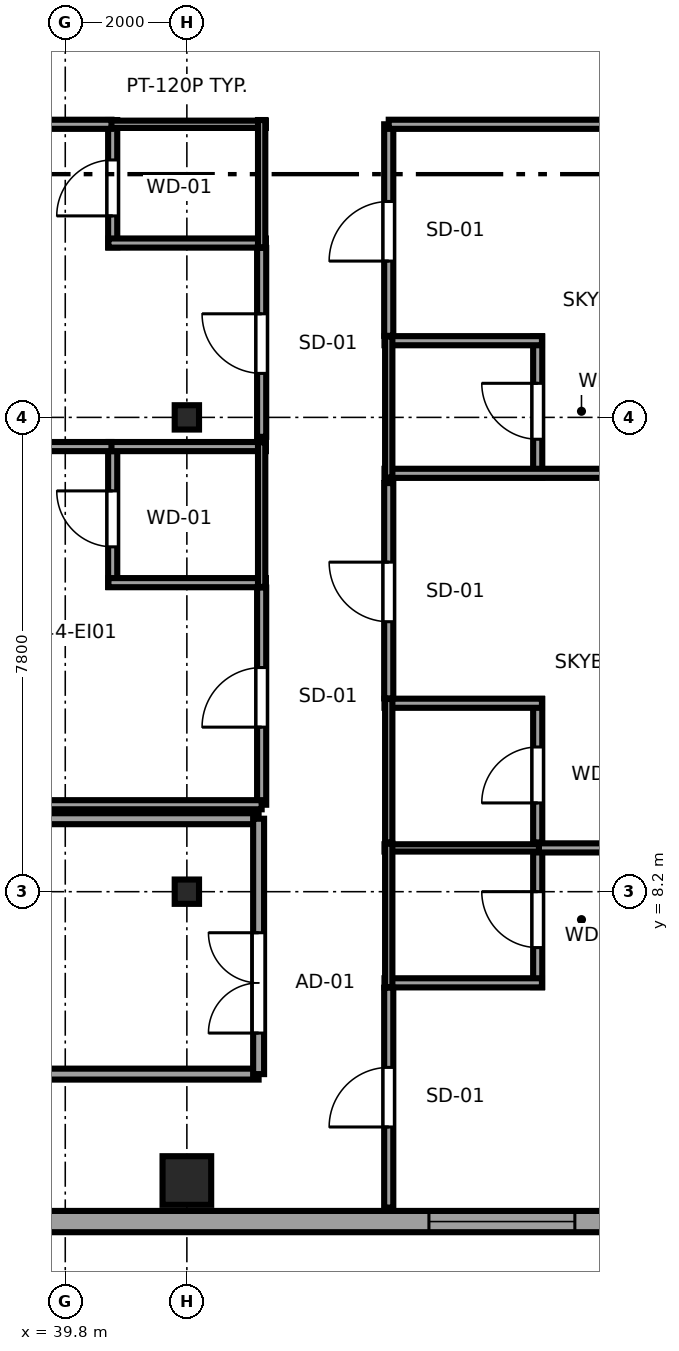
"""IFC4 building model, lengths in metres.
Left out: names, types, materials, properties, quantities, classifications, styles, units other than length and angle.
Written with IfcOpenShell. Run it as: python <this file> out.ifc"""

import sys

from ifc_helpers import new_model, si_unit, direction, frame, frame_2d, origin, origin_2d, place, context, subcontext, project, spatial, rectangle, i_section, extrude, source, transform, mapped, element, fill, save


model = new_model("IFC4")
c1 = context("Model", 3, precision=1e-05, world=origin(), true_north=direction((0.0, 1.0)))
c2 = subcontext(c1, "Body", "Model", "MODEL_VIEW")
j1 = project(units=[si_unit("LENGTHUNIT", "METRE"), si_unit("PLANEANGLEUNIT", "RADIAN")], contexts=[c1])
p1 = place(None, origin())
s1 = spatial("IfcSite", under=j1, at=p1, CompositionType="ELEMENT")
p2 = place(p1, origin())
s2 = spatial("IfcBuilding", under=s1, at=p2, CompositionType="ELEMENT")
p3 = place(p2, frame((0.0, 0.0, 168.35)))
s3 = spatial("IfcBuildingStorey", under=s2, at=p3, CompositionType="ELEMENT", Elevation=168.35)
m1 = source(origin(), c2, "Body", "SweptSolid", [
    extrude(rectangle(XDim=0.8, YDim=0.8, at=origin_2d()), origin(), (0.0, 0.0, 1.0), 3.55),
])
p4 = place(p3, frame((41.8, 3.45, 0.0), z_axis=(0.0, 0.0, 1.0), x_axis=(1.0, 0.0, 0.0)))
e1 = element("IfcColumn", 1, at=p4, inside=s3, PredefinedType="COLUMN", context=c2, shape_type="MappedRepresentation", body=[
    mapped(m1, transform((0.0, 0.0, 0.0), x_axis=(1.0, 0.0, 0.0), y_axis=(0.0, 1.0, 0.0), z_axis=(0.0, 0.0, 1.0), scale=1.0)),
])
m2 = source(origin(), c2, "Body", "SweptSolid", [
    extrude(i_section(OverallWidth=0.4, OverallDepth=0.4, WebThickness=0.02, FlangeThickness=0.035, at=origin_2d()), origin(), (0.0, 0.0, 1.0), 3.55),
])
for number, where, z_axis, x_axis in (
    (2, (41.8, 8.2, 0.0), (0.0, 0.0, 1.0), (1.0, 0.0, 0.0)),
    (3, (41.8, 16.0, 0.0), (0.0, 0.0, 1.0), (1.0, 0.0, 0.0)),
):
    element("IfcColumn", number, at=place(p3, frame(where, z_axis=z_axis, x_axis=x_axis)), inside=s3, PredefinedType="COLUMN", context=c2, shape_type="MappedRepresentation", body=[
        mapped(m2, transform((0.0, 0.0, 0.0), x_axis=(1.0, 0.0, 0.0), y_axis=(0.0, 1.0, 0.0), z_axis=(0.0, 0.0, 1.0), scale=1.0)),
    ])
p5 = place(p3, frame((34.375, 2.775, 0.0), z_axis=(0.0, 0.0, 1.0), x_axis=(1.0, 0.0, 0.0)))
e4 = element("IfcWall", 4, at=p5, inside=s3, PredefinedType="SOLIDWALL", context=c2, shape_type="SweptSolid", body=[
    extrude(rectangle(XDim=15.608, YDim=0.35, at=frame_2d((7.804, 0.0))), origin(), (0.0, 0.0, 1.0), 3.37),
])
p6 = place(p5, frame((1.801, 0.0, 0.68)))
e5 = element("IfcOpeningElement", 5, at=p6, cuts=e4, PredefinedType="OPENING", context=c2, shape_type="SweptSolid", body=[
    extrude(rectangle(XDim=2.4, YDim=1.9, at=frame_2d((1.2, 0.95))), frame((0.0, 0.185, 0.0), z_axis=(0.0, -1.0, 0.0), x_axis=(1.0, 0.0, 0.0)), (0.0, 0.0, 1.0), 0.37),
])
p7 = place(p5, frame((11.406, 0.0, 0.68)))
e6 = element("IfcOpeningElement", 6, at=p7, cuts=e4, PredefinedType="OPENING", context=c2, shape_type="SweptSolid", body=[
    extrude(rectangle(XDim=2.4, YDim=1.9, at=frame_2d((1.2, 0.95))), frame((0.0, 0.185, 0.0), z_axis=(0.0, -1.0, 0.0), x_axis=(1.0, 0.0, 0.0)), (0.0, 0.0, 1.0), 0.37),
])
p8 = place(p3, frame((40.58, 13.212, 0.0), z_axis=(0.0, 0.0, 1.0), x_axis=(0.0, 1.0, 0.0)))
e7 = element("IfcWall", 7, at=p8, inside=s3, PredefinedType="PARTITIONING", context=c2, shape_type="SweptSolid", body=[
    extrude(rectangle(XDim=2.378, YDim=0.15, at=frame_2d((1.189, 0.0))), origin(), (0.0, 0.0, 1.0), 3.37),
])
p9 = place(p8, frame((0.659, 0.0, 0.0)))
e8 = element("IfcOpeningElement", 8, at=p9, cuts=e7, PredefinedType="OPENING", context=c2, shape_type="SweptSolid", body=[
    extrude(rectangle(XDim=0.92, YDim=2.01, at=frame_2d((0.46, 1.005))), frame((0.0, 0.085, 0.0), z_axis=(0.0, -1.0, 0.0), x_axis=(1.0, 0.0, 0.0)), (0.0, 0.0, 1.0), 0.17),
])
for number, where, z_axis, x_axis in (
    (9, (40.51, 13.282, 0.0), (0.0, 0.0, 1.0), (1.0, 0.0, 0.0)),
    (10, (40.51, 15.52, 0.0), (0.0, 0.0, 1.0), (1.0, 0.0, 0.0)),
):
    element("IfcWall", number, at=place(p3, frame(where, z_axis=z_axis, x_axis=x_axis)), inside=s3, PredefinedType="PARTITIONING", context=c2, shape_type="SweptSolid", body=[
        extrude(rectangle(XDim=2.59, YDim=0.15, at=frame_2d((1.295, 0.0))), origin(), (0.0, 0.0, 1.0), 3.37),
    ])
p10 = place(p3, frame((43.03, 13.212, 0.0), z_axis=(0.0, 0.0, 1.0), x_axis=(0.0, 1.0, 0.0)))
e11 = element("IfcWall", 11, at=p10, inside=s3, PredefinedType="PLUMBINGWALL", context=c2, shape_type="SweptSolid", body=[
    extrude(rectangle(XDim=2.378, YDim=0.12, at=frame_2d((1.189, 0.0))), origin(), (0.0, 0.0, 1.0), 3.37),
])
p11 = place(p3, frame((40.58, 18.797, 0.0), z_axis=(0.0, 0.0, 1.0), x_axis=(0.0, 1.0, 0.0)))
e12 = element("IfcWall", 12, at=p11, inside=s3, PredefinedType="PARTITIONING", context=c2, shape_type="SweptSolid", body=[
    extrude(rectangle(XDim=2.093, YDim=0.15, at=frame_2d((1.046, 0.0))), origin(), (0.0, 0.0, 1.0), 3.37),
])
p12 = place(p11, frame((0.517, 0.0, 0.0)))
e13 = element("IfcOpeningElement", 13, at=p12, cuts=e12, PredefinedType="OPENING", context=c2, shape_type="SweptSolid", body=[
    extrude(rectangle(XDim=0.92, YDim=2.01, at=frame_2d((0.46, 1.005))), frame((0.0, 0.085, 0.0), z_axis=(0.0, -1.0, 0.0), x_axis=(1.0, 0.0, 0.0)), (0.0, 0.0, 1.0), 0.17),
])
p13 = place(p3, frame((40.51, 18.867, 0.0), z_axis=(0.0, 0.0, 1.0), x_axis=(1.0, 0.0, 0.0)))
e14 = element("IfcWall", 14, at=p13, inside=s3, PredefinedType="PARTITIONING", context=c2, shape_type="SweptSolid", body=[
    extrude(rectangle(XDim=2.59, YDim=0.15, at=frame_2d((1.295, 0.0))), origin(), (0.0, 0.0, 1.0), 3.37),
])
p14 = place(p3, frame((40.51, 20.82, 0.0), z_axis=(0.0, 0.0, 1.0), x_axis=(1.0, 0.0, 0.0)))
e15 = element("IfcWall", 15, at=p14, inside=s3, PredefinedType="PLUMBINGWALL", context=c2, shape_type="SweptSolid", body=[
    extrude(rectangle(XDim=2.59, YDim=0.12, at=frame_2d((1.295, 0.0))), origin(), (0.0, 0.0, 1.0), 3.37),
])
p15 = place(p3, frame((43.03, 18.797, 0.0), z_axis=(0.0, 0.0, 1.0), x_axis=(0.0, 1.0, 0.0)))
e16 = element("IfcWall", 16, at=p15, inside=s3, PredefinedType="PLUMBINGWALL", context=c2, shape_type="SweptSolid", body=[
    extrude(rectangle(XDim=2.093, YDim=0.12, at=frame_2d((1.046, 0.0))), origin(), (0.0, 0.0, 1.0), 3.37),
])
p16 = place(p3, frame((47.57, 6.631, 0.0), z_axis=(0.0, 0.0, 1.0), x_axis=(0.0, 1.0, 0.0)))
e17 = element("IfcWall", 17, at=p16, inside=s3, PredefinedType="PARTITIONING", context=c2, shape_type="SweptSolid", body=[
    extrude(rectangle(XDim=2.359, YDim=0.15, at=frame_2d((1.179, 0.0))), origin(), (0.0, 0.0, 1.0), 3.37),
])
p17 = place(p16, frame((0.649, 0.0, 0.0)))
e18 = element("IfcOpeningElement", 18, at=p17, cuts=e17, PredefinedType="OPENING", context=c2, shape_type="SweptSolid", body=[
    extrude(rectangle(XDim=0.92, YDim=2.01, at=frame_2d((0.46, 1.005))), frame((0.0, 0.085, 0.0), z_axis=(0.0, -1.0, 0.0), x_axis=(1.0, 0.0, 0.0)), (0.0, 0.0, 1.0), 0.17),
])
p18 = place(p3, frame((45.05, 6.701, 0.0), z_axis=(0.0, 0.0, 1.0), x_axis=(1.0, 0.0, 0.0)))
e19 = element("IfcWall", 19, at=p18, inside=s3, PredefinedType="PARTITIONING", context=c2, shape_type="SweptSolid", body=[
    extrude(rectangle(XDim=2.59, YDim=0.15, at=frame_2d((1.295, 0.0))), origin(), (0.0, 0.0, 1.0), 3.37),
])
p19 = place(p3, frame((45.05, 8.92, 0.0), z_axis=(0.0, 0.0, 1.0), x_axis=(1.0, 0.0, 0.0)))
e20 = element("IfcWall", 20, at=p19, inside=s3, PredefinedType="PLUMBINGWALL", context=c2, shape_type="SweptSolid", body=[
    extrude(rectangle(XDim=2.59, YDim=0.12, at=frame_2d((1.295, 0.0))), origin(), (0.0, 0.0, 1.0), 3.37),
])
p20 = place(p3, frame((45.12, 6.631, 0.0), z_axis=(0.0, 0.0, 1.0), x_axis=(0.0, 1.0, 0.0)))
e21 = element("IfcWall", 21, at=p20, inside=s3, PredefinedType="PLUMBINGWALL", context=c2, shape_type="SweptSolid", body=[
    extrude(rectangle(XDim=2.359, YDim=0.12, at=frame_2d((1.179, 0.0))), origin(), (0.0, 0.0, 1.0), 3.37),
])
p21 = place(p3, frame((47.57, 9.01, 0.0), z_axis=(0.0, 0.0, 1.0), x_axis=(0.0, 1.0, 0.0)))
e22 = element("IfcWall", 22, at=p21, inside=s3, PredefinedType="PARTITIONING", context=c2, shape_type="SweptSolid", body=[
    extrude(rectangle(XDim=2.359, YDim=0.15, at=frame_2d((1.179, 0.0))), origin(), (0.0, 0.0, 1.0), 3.37),
])
p22 = place(p21, frame((0.649, 0.0, 0.0)))
e23 = element("IfcOpeningElement", 23, at=p22, cuts=e22, PredefinedType="OPENING", context=c2, shape_type="SweptSolid", body=[
    extrude(rectangle(XDim=0.92, YDim=2.01, at=frame_2d((0.46, 1.005))), frame((0.0, 0.085, 0.0), z_axis=(0.0, -1.0, 0.0), x_axis=(1.0, 0.0, 0.0)), (0.0, 0.0, 1.0), 0.17),
])
p23 = place(p3, frame((45.05, 11.299, 0.0), z_axis=(0.0, 0.0, 1.0), x_axis=(1.0, 0.0, 0.0)))
e24 = element("IfcWall", 24, at=p23, inside=s3, PredefinedType="PARTITIONING", context=c2, shape_type="SweptSolid", body=[
    extrude(rectangle(XDim=2.59, YDim=0.15, at=frame_2d((1.295, 0.0))), origin(), (0.0, 0.0, 1.0), 3.37),
])
p24 = place(p3, frame((45.12, 9.01, 0.0), z_axis=(0.0, 0.0, 1.0), x_axis=(0.0, 1.0, 0.0)))
e25 = element("IfcWall", 25, at=p24, inside=s3, PredefinedType="PLUMBINGWALL", context=c2, shape_type="SweptSolid", body=[
    extrude(rectangle(XDim=2.359, YDim=0.12, at=frame_2d((1.179, 0.0))), origin(), (0.0, 0.0, 1.0), 3.37),
])
p25 = place(p3, frame((47.57, 15.01, 0.0), z_axis=(0.0, 0.0, 1.0), x_axis=(0.0, 1.0, 0.0)))
e26 = element("IfcWall", 26, at=p25, inside=s3, PredefinedType="PARTITIONING", context=c2, shape_type="SweptSolid", body=[
    extrude(rectangle(XDim=2.321, YDim=0.15, at=frame_2d((1.161, 0.0))), origin(), (0.0, 0.0, 1.0), 3.37),
])
p26 = place(p25, frame((0.631, 0.0, 0.0)))
e27 = element("IfcOpeningElement", 27, at=p26, cuts=e26, PredefinedType="OPENING", context=c2, shape_type="SweptSolid", body=[
    extrude(rectangle(XDim=0.92, YDim=2.01, at=frame_2d((0.46, 1.005))), frame((0.0, 0.085, 0.0), z_axis=(0.0, -1.0, 0.0), x_axis=(1.0, 0.0, 0.0)), (0.0, 0.0, 1.0), 0.17),
])
p27 = place(p3, frame((45.05, 15.08, 0.0), z_axis=(0.0, 0.0, 1.0), x_axis=(1.0, 0.0, 0.0)))
e28 = element("IfcWall", 28, at=p27, inside=s3, PredefinedType="PARTITIONING", context=c2, shape_type="SweptSolid", body=[
    extrude(rectangle(XDim=9.05, YDim=0.15, at=frame_2d((4.525, 0.0))), origin(), (0.0, 0.0, 1.0), 3.37),
])
p28 = place(p3, frame((45.05, 17.261, 0.0), z_axis=(0.0, 0.0, 1.0), x_axis=(1.0, 0.0, 0.0)))
e29 = element("IfcWall", 29, at=p28, inside=s3, PredefinedType="PARTITIONING", context=c2, shape_type="SweptSolid", body=[
    extrude(rectangle(XDim=2.59, YDim=0.15, at=frame_2d((1.295, 0.0))), origin(), (0.0, 0.0, 1.0), 3.37),
])
p29 = place(p3, frame((45.12, 15.01, 0.0), z_axis=(0.0, 0.0, 1.0), x_axis=(0.0, 1.0, 0.0)))
e30 = element("IfcWall", 30, at=p29, inside=s3, PredefinedType="PLUMBINGWALL", context=c2, shape_type="SweptSolid", body=[
    extrude(rectangle(XDim=2.321, YDim=0.12, at=frame_2d((1.161, 0.0))), origin(), (0.0, 0.0, 1.0), 3.37),
])
p30 = place(p3, frame((43.03, 9.63, 0.0), z_axis=(0.0, 0.0, 1.0), x_axis=(0.0, 1.0, 0.0)))
e31 = element("IfcWall", 31, at=p30, inside=s3, PredefinedType="PARTITIONING", context=c2, shape_type="SweptSolid", body=[
    extrude(rectangle(XDim=3.572, YDim=0.15, at=frame_2d((1.786, 0.0))), origin(), (0.0, 0.0, 1.0), 3.37),
])
p31 = place(p30, frame((1.276, 0.0, 0.0)))
e32 = element("IfcOpeningElement", 32, at=p31, cuts=e31, PredefinedType="OPENING", context=c2, shape_type="SweptSolid", body=[
    extrude(rectangle(XDim=0.98, YDim=2.12, at=frame_2d((0.49, 1.06))), frame((0.0, 0.085, 0.0), z_axis=(0.0, -1.0, 0.0), x_axis=(1.0, 0.0, 0.0)), (0.0, 0.0, 1.0), 0.17),
])
p32 = place(p3, frame((34.65, 9.63, 0.0), z_axis=(0.0, 0.0, 1.0), x_axis=(1.0, 0.0, 0.0)))
e33 = element("IfcWall", 33, at=p32, inside=s3, PredefinedType="PARTITIONING", context=c2, shape_type="SweptSolid", body=[
    extrude(rectangle(XDim=8.38, YDim=0.15, at=frame_2d((4.19, 0.0))), origin(), (0.0, 0.0, 1.0), 2.748),
])
p33 = place(p3, frame((34.65, 15.52, 0.0), z_axis=(0.0, 0.0, 1.0), x_axis=(1.0, 0.0, 0.0)))
e34 = element("IfcWall", 34, at=p33, inside=s3, PredefinedType="PARTITIONING", context=c2, shape_type="SweptSolid", body=[
    extrude(rectangle(XDim=5.91, YDim=0.15, at=frame_2d((2.955, 0.0))), origin(), (0.0, 0.0, 1.0), 3.37),
])
p34 = place(p3, frame((43.03, 15.68, 0.0), z_axis=(0.0, 0.0, 1.0), x_axis=(0.0, 1.0, 0.0)))
e35 = element("IfcWall", 35, at=p34, inside=s3, PredefinedType="PARTITIONING", context=c2, shape_type="SweptSolid", body=[
    extrude(rectangle(XDim=3.107, YDim=0.15, at=frame_2d((1.554, 0.0))), origin(), (0.0, 0.0, 1.0), 3.37),
])
p35 = place(p34, frame((1.043, 0.0, 0.0)))
e36 = element("IfcOpeningElement", 36, at=p35, cuts=e35, PredefinedType="OPENING", context=c2, shape_type="SweptSolid", body=[
    extrude(rectangle(XDim=0.98, YDim=2.12, at=frame_2d((0.49, 1.06))), frame((0.0, 0.085, 0.0), z_axis=(0.0, -1.0, 0.0), x_axis=(1.0, 0.0, 0.0)), (0.0, 0.0, 1.0), 0.17),
])
p36 = place(p3, frame((34.65, 20.82, 0.0), z_axis=(0.0, 0.0, 1.0), x_axis=(1.0, 0.0, 0.0)))
e37 = element("IfcWall", 37, at=p36, inside=s3, PredefinedType="PARTITIONING", context=c2, shape_type="SweptSolid", body=[
    extrude(rectangle(XDim=5.91, YDim=0.15, at=frame_2d((2.955, 0.0))), origin(), (0.0, 0.0, 1.0), 3.37),
])
p37 = place(p3, frame((45.12, 3.005, 0.0), z_axis=(0.0, 0.0, 1.0), x_axis=(0.0, 1.0, 0.0)))
e38 = element("IfcWall", 38, at=p37, inside=s3, PredefinedType="PARTITIONING", context=c2, shape_type="SweptSolid", body=[
    extrude(rectangle(XDim=3.616, YDim=0.15, at=frame_2d((1.808, 0.0))), origin(), (0.0, 0.0, 1.0), 3.37),
])
p38 = place(p37, frame((1.325, 0.0, 0.0)))
e39 = element("IfcOpeningElement", 39, at=p38, cuts=e38, PredefinedType="OPENING", context=c2, shape_type="SweptSolid", body=[
    extrude(rectangle(XDim=0.98, YDim=2.12, at=frame_2d((0.49, 1.06))), frame((0.0, 0.085, 0.0), z_axis=(0.0, -1.0, 0.0), x_axis=(1.0, 0.0, 0.0)), (0.0, 0.0, 1.0), 0.17),
])
p39 = place(p3, frame((47.59, 8.92, 0.0), z_axis=(0.0, 0.0, 1.0), x_axis=(1.0, 0.0, 0.0)))
e40 = element("IfcWall", 40, at=p39, inside=s3, PredefinedType="PARTITIONING", context=c2, shape_type="SweptSolid", body=[
    extrude(rectangle(XDim=6.51, YDim=0.15, at=frame_2d((3.255, 0.0))), origin(), (0.0, 0.0, 1.0), 3.37),
])
p40 = place(p3, frame((45.12, 11.379, 0.0), z_axis=(0.0, 0.0, 1.0), x_axis=(0.0, 1.0, 0.0)))
e41 = element("IfcWall", 41, at=p40, inside=s3, PredefinedType="PARTITIONING", context=c2, shape_type="SweptSolid", body=[
    extrude(rectangle(XDim=3.541, YDim=0.15, at=frame_2d((1.771, 0.0))), origin(), (0.0, 0.0, 1.0), 3.37),
])
p41 = place(p40, frame((1.26, 0.0, 0.0)))
e42 = element("IfcOpeningElement", 42, at=p41, cuts=e41, PredefinedType="OPENING", context=c2, shape_type="SweptSolid", body=[
    extrude(rectangle(XDim=0.98, YDim=2.12, at=frame_2d((0.49, 1.06))), frame((0.0, 0.085, 0.0), z_axis=(0.0, -1.0, 0.0), x_axis=(1.0, 0.0, 0.0)), (0.0, 0.0, 1.0), 0.17),
])
p42 = place(p3, frame((45.12, 17.341, 0.0), z_axis=(0.0, 0.0, 1.0), x_axis=(0.0, 1.0, 0.0)))
e43 = element("IfcWall", 43, at=p42, inside=s3, PredefinedType="PARTITIONING", context=c2, shape_type="SweptSolid", body=[
    extrude(rectangle(XDim=3.479, YDim=0.15, at=frame_2d((1.74, 0.0))), origin(), (0.0, 0.0, 1.0), 3.37),
])
p43 = place(p42, frame((1.229, 0.0, 0.0)))
e44 = element("IfcOpeningElement", 44, at=p43, cuts=e43, PredefinedType="OPENING", context=c2, shape_type="SweptSolid", body=[
    extrude(rectangle(XDim=0.98, YDim=2.12, at=frame_2d((0.49, 1.06))), frame((0.0, 0.085, 0.0), z_axis=(0.0, -1.0, 0.0), x_axis=(1.0, 0.0, 0.0)), (0.0, 0.0, 1.0), 0.17),
])
p44 = place(p3, frame((45.12, 20.82, 0.0), z_axis=(0.0, 0.0, 1.0), x_axis=(1.0, 0.0, 0.0)))
e45 = element("IfcWall", 45, at=p44, inside=s3, PredefinedType="PARTITIONING", context=c2, shape_type="SweptSolid", body=[
    extrude(rectangle(XDim=8.98, YDim=0.15, at=frame_2d((4.49, 0.0))), origin(), (0.0, 0.0, 1.0), 3.37),
])
for number, where, z_axis, x_axis in (
    (46, (14.47, 5.2, 0.0), (0.0, 0.0, 1.0), (1.0, 0.0, 0.0)),
    (47, (14.47, 9.4, 0.0), (0.0, 0.0, 1.0), (1.0, 0.0, 0.0)),
):
    element("IfcWall", number, at=place(p3, frame(where, z_axis=z_axis, x_axis=x_axis)), inside=s3, PredefinedType="PARTITIONING", context=c2, shape_type="SweptSolid", body=[
        extrude(rectangle(XDim=28.51, YDim=0.18, at=frame_2d((14.255, 0.0))), origin(), (0.0, 0.0, 1.0), 3.37),
    ])
p45 = place(p3, frame((42.98, 5.2, 0.0), z_axis=(0.0, 0.0, 1.0), x_axis=(0.0, 1.0, 0.0)))
e48 = element("IfcWall", 48, at=p45, inside=s3, PredefinedType="PARTITIONING", context=c2, shape_type="SweptSolid", body=[
    extrude(rectangle(XDim=4.2, YDim=0.18, at=frame_2d((2.1, 0.0))), origin(), (0.0, 0.0, 1.0), 3.37),
])
p46 = place(p45, frame((0.675, 0.0, 0.0)))
e49 = element("IfcOpeningElement", 49, at=p46, cuts=e48, PredefinedType="OPENING", context=c2, shape_type="SweptSolid", body=[
    extrude(rectangle(XDim=1.65, YDim=2.15, at=frame_2d((0.825, 1.075))), frame((0.0, 0.1, 0.0), z_axis=(0.0, -1.0, 0.0), x_axis=(1.0, 0.0, 0.0)), (0.0, 0.0, 1.0), 0.2),
])
m3 = source(origin(), c2, "Body", "SweptSolid", [
    extrude(rectangle(XDim=2.4, YDim=1.9, at=frame_2d((1.2, 0.95))), frame((0.0, 0.09, 0.0), z_axis=(0.0, -1.0, 0.0), x_axis=(1.0, 0.0, 0.0)), (0.0, 0.0, 1.0), 0.06),
])
p47 = place(p7, origin())
e50 = element("IfcWindow", 50, at=p47, inside=s3, PartitioningType="TRIPLE_PANEL_HORIZONTAL", PredefinedType="WINDOW", context=c2, shape_type="MappedRepresentation", body=[
    mapped(m3, transform((0.0, 0.0, 0.0), x_axis=(1.0, 0.0, 0.0), y_axis=(0.0, 1.0, 0.0), z_axis=(0.0, 0.0, 1.0), scale=1.0)),
])
fill(e6, e50)
m4 = source(origin(), c2, "Body", "SweptSolid", [
    extrude(rectangle(XDim=0.92, YDim=2.01, at=frame_2d((0.46, 1.005))), frame((0.0, 0.025, 0.0), z_axis=(0.0, -1.0, 0.0), x_axis=(1.0, 0.0, 0.0)), (0.0, 0.0, 1.0), 0.05),
])
p48 = place(p9, origin())
e51 = element("IfcDoor", 51, at=p48, inside=s3, OperationType="SINGLE_SWING_RIGHT", PredefinedType="DOOR", context=c2, shape_type="MappedRepresentation", body=[
    mapped(m4, transform((0.0, 0.0, 0.0), x_axis=(1.0, 0.0, 0.0), y_axis=(0.0, 1.0, 0.0), z_axis=(0.0, 0.0, 1.0), scale=1.0)),
])
fill(e8, e51)
p49 = place(p12, origin())
e52 = element("IfcDoor", 52, at=p49, inside=s3, OperationType="SINGLE_SWING_LEFT", PredefinedType="DOOR", context=c2, shape_type="MappedRepresentation", body=[
    mapped(m4, transform((0.0, 0.0, 0.0), x_axis=(1.0, 0.0, 0.0), y_axis=(0.0, 1.0, 0.0), z_axis=(0.0, 0.0, 1.0), scale=1.0)),
])
fill(e13, e52)
p50 = place(p17, origin())
e53 = element("IfcDoor", 53, at=p50, inside=s3, OperationType="SINGLE_SWING_RIGHT", PredefinedType="DOOR", context=c2, shape_type="MappedRepresentation", body=[
    mapped(m4, transform((0.0, 0.0, 0.0), x_axis=(1.0, 0.0, 0.0), y_axis=(0.0, 1.0, 0.0), z_axis=(0.0, 0.0, 1.0), scale=1.0)),
])
fill(e18, e53)
p51 = place(p22, origin())
e54 = element("IfcDoor", 54, at=p51, inside=s3, OperationType="SINGLE_SWING_LEFT", PredefinedType="DOOR", context=c2, shape_type="MappedRepresentation", body=[
    mapped(m4, transform((0.0, 0.0, 0.0), x_axis=(1.0, 0.0, 0.0), y_axis=(0.0, 1.0, 0.0), z_axis=(0.0, 0.0, 1.0), scale=1.0)),
])
fill(e23, e54)
p52 = place(p26, origin())
e55 = element("IfcDoor", 55, at=p52, inside=s3, OperationType="SINGLE_SWING_RIGHT", PredefinedType="DOOR", context=c2, shape_type="MappedRepresentation", body=[
    mapped(m4, transform((0.0, 0.0, 0.0), x_axis=(1.0, 0.0, 0.0), y_axis=(0.0, 1.0, 0.0), z_axis=(0.0, 0.0, 1.0), scale=1.0)),
])
fill(e27, e55)
m5 = source(origin(), c2, "Body", "SweptSolid", [
    extrude(rectangle(XDim=0.98, YDim=2.12, at=frame_2d((0.49, 1.06))), frame((0.0, 0.025, 0.0), z_axis=(0.0, -1.0, 0.0), x_axis=(1.0, 0.0, 0.0)), (0.0, 0.0, 1.0), 0.05),
])
p53 = place(p31, origin())
e56 = element("IfcDoor", 56, at=p53, inside=s3, OperationType="SINGLE_SWING_LEFT", PredefinedType="DOOR", context=c2, shape_type="MappedRepresentation", body=[
    mapped(m5, transform((0.0, 0.0, 0.0), x_axis=(1.0, 0.0, 0.0), y_axis=(0.0, 1.0, 0.0), z_axis=(0.0, 0.0, 1.0), scale=1.0)),
])
fill(e32, e56)
p54 = place(p35, origin())
e57 = element("IfcDoor", 57, at=p54, inside=s3, OperationType="SINGLE_SWING_RIGHT", PredefinedType="DOOR", context=c2, shape_type="MappedRepresentation", body=[
    mapped(m5, transform((0.0, 0.0, 0.0), x_axis=(1.0, 0.0, 0.0), y_axis=(0.0, 1.0, 0.0), z_axis=(0.0, 0.0, 1.0), scale=1.0)),
])
fill(e36, e57)
p55 = place(p38, origin())
e58 = element("IfcDoor", 58, at=p55, inside=s3, OperationType="SINGLE_SWING_LEFT", PredefinedType="DOOR", context=c2, shape_type="MappedRepresentation", body=[
    mapped(m5, transform((0.0, 0.0, 0.0), x_axis=(1.0, 0.0, 0.0), y_axis=(0.0, 1.0, 0.0), z_axis=(0.0, 0.0, 1.0), scale=1.0)),
])
fill(e39, e58)
p56 = place(p41, origin())
e59 = element("IfcDoor", 59, at=p56, inside=s3, OperationType="SINGLE_SWING_RIGHT", PredefinedType="DOOR", context=c2, shape_type="MappedRepresentation", body=[
    mapped(m5, transform((0.0, 0.0, 0.0), x_axis=(1.0, 0.0, 0.0), y_axis=(0.0, 1.0, 0.0), z_axis=(0.0, 0.0, 1.0), scale=1.0)),
])
fill(e42, e59)
p57 = place(p43, origin())
e60 = element("IfcDoor", 60, at=p57, inside=s3, OperationType="SINGLE_SWING_LEFT", PredefinedType="DOOR", context=c2, shape_type="MappedRepresentation", body=[
    mapped(m5, transform((0.0, 0.0, 0.0), x_axis=(1.0, 0.0, 0.0), y_axis=(0.0, 1.0, 0.0), z_axis=(0.0, 0.0, 1.0), scale=1.0)),
])
fill(e44, e60)
m6 = source(origin(), c2, "Body", "SweptSolid", [
    extrude(rectangle(XDim=1.65, YDim=2.15, at=frame_2d((0.825, 1.075))), frame((0.0, 0.025, 0.0), z_axis=(0.0, -1.0, 0.0), x_axis=(1.0, 0.0, 0.0)), (0.0, 0.0, 1.0), 0.05),
])
p58 = place(p46, origin())
e61 = element("IfcDoor", 61, at=p58, inside=s3, OperationType="DOUBLE_DOOR_SINGLE_SWING", PredefinedType="DOOR", context=c2, shape_type="MappedRepresentation", body=[
    mapped(m6, transform((0.0, 0.0, 0.0), x_axis=(1.0, 0.0, 0.0), y_axis=(0.0, 1.0, 0.0), z_axis=(0.0, 0.0, 1.0), scale=1.0)),
])
fill(e49, e61)
save(model, sys.argv[1])
